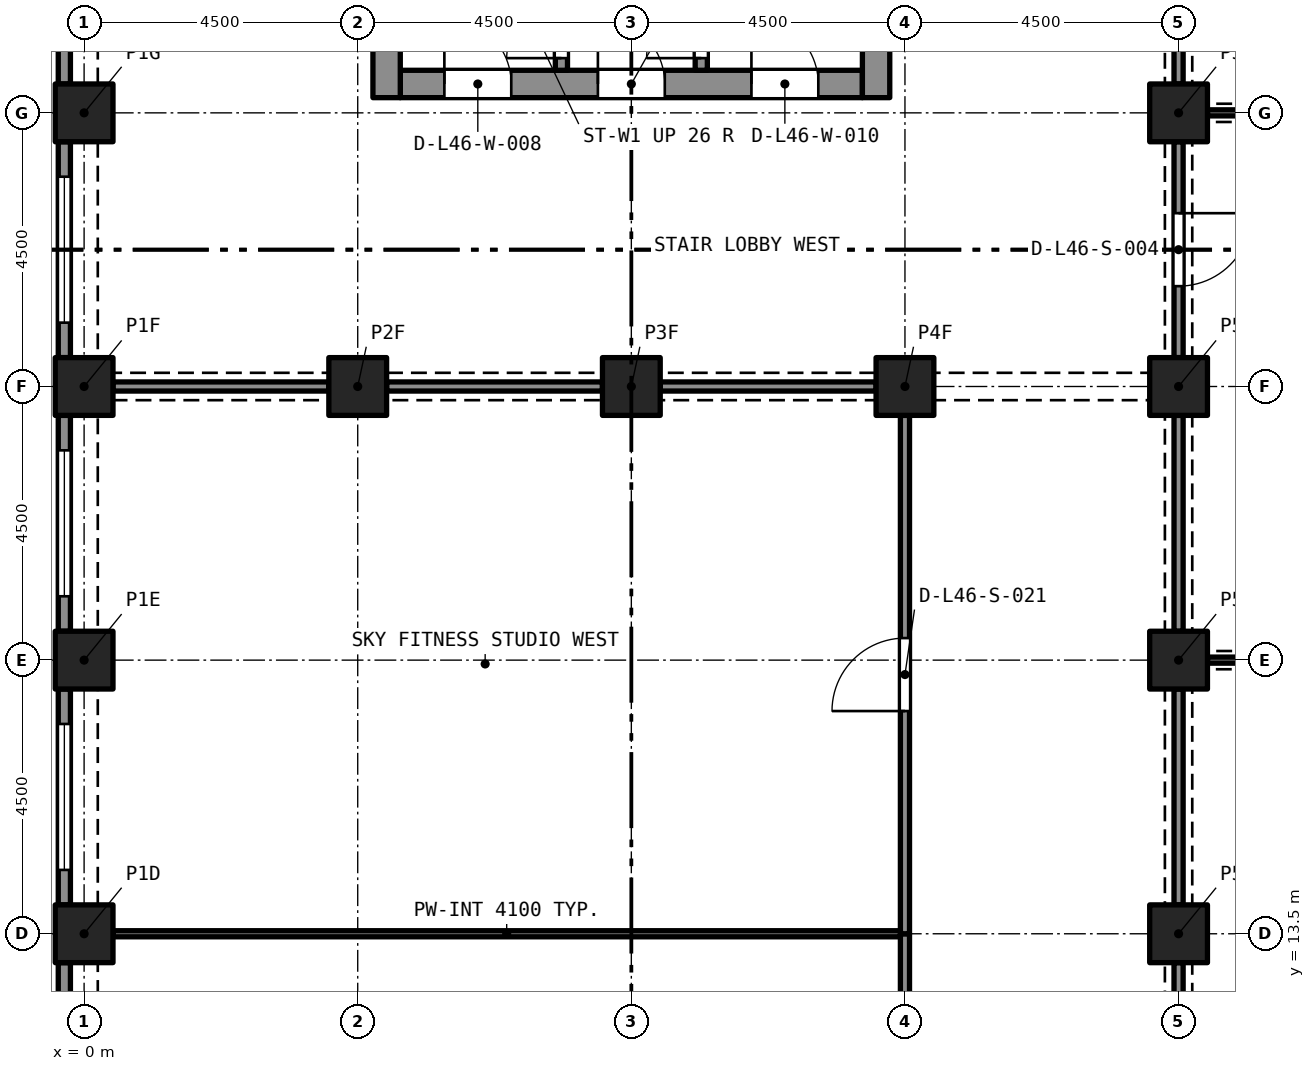
"""IFC4 building model, lengths in metres.
Left out: names, types, materials, properties, quantities, classifications, styles, units other than length and angle.
Written with IfcOpenShell. Run it as: python <this file> out.ifc"""

import sys

from ifc_helpers import new_model, si_unit, direction, frame, frame_2d, origin, origin_2d, place, context, subcontext, project, spatial, rectangle, extrude, element, fill, save


model = new_model("IFC4")
c1 = context("Model", 3, precision=1e-05, world=origin(), true_north=direction((0.0, 1.0)))
c2 = subcontext(c1, "Body", "Model", "MODEL_VIEW")
j1 = project(units=[si_unit("LENGTHUNIT", "METRE"), si_unit("PLANEANGLEUNIT", "RADIAN")], contexts=[c1])
p1 = place(None, origin())
s1 = spatial("IfcSite", under=j1, at=p1, CompositionType="ELEMENT")
p2 = place(p1, origin())
s2 = spatial("IfcBuilding", under=s1, at=p2, CompositionType="ELEMENT")
p3 = place(p2, frame((0.0, 0.0, 168.2)))
s3 = spatial("IfcBuildingStorey", under=s2, at=p3, CompositionType="ELEMENT", Elevation=168.2)
for number, where, z_axis, x_axis in (
    (1, (0.0, 13.5, 0.0), (0.0, 0.0, 1.0), (1.0, 0.0, 0.0)),
    (2, (18.0, 13.5, 0.0), (0.0, 0.0, 1.0), (1.0, 0.0, 0.0)),
    (3, (0.0, 18.0, 0.0), (0.0, 0.0, 1.0), (1.0, 0.0, 0.0)),
    (4, (18.0, 18.0, 0.0), (0.0, 0.0, 1.0), (1.0, 0.0, 0.0)),
    (5, (0.0, 22.5, 0.0), (0.0, 0.0, 1.0), (1.0, 0.0, 0.0)),
    (6, (4.5, 22.5, 0.0), (0.0, 0.0, 1.0), (1.0, 0.0, 0.0)),
    (7, (9.0, 22.5, 0.0), (0.0, 0.0, 1.0), (1.0, 0.0, 0.0)),
    (8, (13.5, 22.5, 0.0), (0.0, 0.0, 1.0), (1.0, 0.0, 0.0)),
    (9, (18.0, 22.5, 0.0), (0.0, 0.0, 1.0), (1.0, 0.0, 0.0)),
    (10, (0.0, 27.0, 0.0), (0.0, 0.0, 1.0), (1.0, 0.0, 0.0)),
    (11, (18.0, 27.0, 0.0), (0.0, 0.0, 1.0), (1.0, 0.0, 0.0)),
):
    element("IfcColumn", number, at=place(p3, frame(where, z_axis=z_axis, x_axis=x_axis)), inside=s3, PredefinedType="COLUMN", context=c2, shape_type="SweptSolid", body=[
        extrude(rectangle(XDim=0.95, YDim=0.95, at=origin_2d()), origin(), (0.0, 0.0, 1.0), 4.4),
    ])
p4 = place(p3, frame((5.2, 27.475, 0.0), z_axis=(0.0, 0.0, 1.0), x_axis=(1.0, 0.0, 0.0)))
e12 = element("IfcWall", 12, at=p4, inside=s3, PredefinedType="SOLIDWALL", context=c2, shape_type="SweptSolid", body=[
    extrude(rectangle(XDim=7.6, YDim=0.45, at=frame_2d((3.8, 0.0))), origin(), (0.0, 0.0, 1.0), 4.4),
])
p5 = place(p4, frame((0.725, 0.0, 0.0)))
e13 = element("IfcOpeningElement", 13, at=p5, cuts=e12, PredefinedType="OPENING", context=c2, shape_type="SweptSolid", body=[
    extrude(rectangle(XDim=1.1, YDim=2.1, at=frame_2d((0.55, 1.05))), frame((0.0, 0.235, 0.0), z_axis=(0.0, -1.0, 0.0), x_axis=(1.0, 0.0, 0.0)), (0.0, 0.0, 1.0), 0.47),
])
p6 = place(p4, frame((3.25, 0.0, 0.0)))
e14 = element("IfcOpeningElement", 14, at=p6, cuts=e12, PredefinedType="OPENING", context=c2, shape_type="SweptSolid", body=[
    extrude(rectangle(XDim=1.1, YDim=2.1, at=frame_2d((0.55, 1.05))), frame((0.0, 0.235, 0.0), z_axis=(0.0, -1.0, 0.0), x_axis=(1.0, 0.0, 0.0)), (0.0, 0.0, 1.0), 0.47),
])
p7 = place(p4, frame((5.775, 0.0, 0.0)))
e15 = element("IfcOpeningElement", 15, at=p7, cuts=e12, PredefinedType="OPENING", context=c2, shape_type="SweptSolid", body=[
    extrude(rectangle(XDim=1.1, YDim=2.1, at=frame_2d((0.55, 1.05))), frame((0.0, 0.235, 0.0), z_axis=(0.0, -1.0, 0.0), x_axis=(1.0, 0.0, 0.0)), (0.0, 0.0, 1.0), 0.47),
])
p8 = place(p3, frame((4.975, 27.25, 0.0), z_axis=(0.0, 0.0, 1.0), x_axis=(0.0, 1.0, 0.0)))
e16 = element("IfcWall", 16, at=p8, inside=s3, PredefinedType="SOLIDWALL", context=c2, shape_type="SweptSolid", body=[
    extrude(rectangle(XDim=13.0, YDim=0.45, at=frame_2d((6.5, 0.0))), origin(), (0.0, 0.0, 1.0), 4.4),
])
p9 = place(p8, frame((8.7, 0.0, 0.0)))
e17 = element("IfcOpeningElement", 17, at=p9, cuts=e16, PredefinedType="OPENING", context=c2, shape_type="SweptSolid", body=[
    extrude(rectangle(XDim=1.2, YDim=2.1, at=frame_2d((0.6, 1.05))), frame((0.0, 0.235, 0.0), z_axis=(0.0, -1.0, 0.0), x_axis=(1.0, 0.0, 0.0)), (0.0, 0.0, 1.0), 0.47),
])
p10 = place(p3, frame((13.025, 27.25, 0.0), z_axis=(0.0, 0.0, 1.0), x_axis=(0.0, 1.0, 0.0)))
e18 = element("IfcWall", 18, at=p10, inside=s3, PredefinedType="SOLIDWALL", context=c2, shape_type="SweptSolid", body=[
    extrude(rectangle(XDim=13.0, YDim=0.45, at=frame_2d((6.5, 0.0))), origin(), (0.0, 0.0, 1.0), 4.4),
])
p11 = place(p10, frame((10.85, 0.0, 0.0)))
e19 = element("IfcOpeningElement", 19, at=p11, cuts=e18, PredefinedType="OPENING", context=c2, shape_type="SweptSolid", body=[
    extrude(rectangle(XDim=1.1, YDim=2.1, at=frame_2d((0.55, 1.05))), frame((0.0, 0.235, 0.0), z_axis=(0.0, -1.0, 0.0), x_axis=(1.0, 0.0, 0.0)), (0.0, 0.0, 1.0), 0.47),
])
p12 = place(p10, frame((8.7, 0.0, 0.0)))
e20 = element("IfcOpeningElement", 20, at=p12, cuts=e18, PredefinedType="OPENING", context=c2, shape_type="SweptSolid", body=[
    extrude(rectangle(XDim=1.2, YDim=2.1, at=frame_2d((0.6, 1.05))), frame((0.0, 0.235, 0.0), z_axis=(0.0, -1.0, 0.0), x_axis=(1.0, 0.0, 0.0)), (0.0, 0.0, 1.0), 0.47),
])
p13 = place(p3, frame((-0.325, 27.475, 0.0), z_axis=(0.0, 0.0, 1.0), x_axis=(0.0, 1.0, 0.0)))
e21 = element("IfcWall", 21, at=p13, inside=s3, PredefinedType="SOLIDWALL", context=c2, shape_type="SweptSolid", body=[
    extrude(rectangle(XDim=3.55, YDim=0.2, at=frame_2d((1.775, 0.0))), origin(), (0.0, 0.0, 1.0), 4.4),
])
p14 = place(p13, frame((0.575, 0.0, 0.45)))
e22 = element("IfcOpeningElement", 22, at=p14, cuts=e21, PredefinedType="OPENING", context=c2, shape_type="SweptSolid", body=[
    extrude(rectangle(XDim=2.4, YDim=2.55, at=frame_2d((1.2, 1.275))), frame((0.0, 0.11, 0.0), z_axis=(0.0, -1.0, 0.0), x_axis=(1.0, 0.0, 0.0)), (0.0, 0.0, 1.0), 0.22),
])
p15 = place(p3, frame((-0.325, 22.975, 0.0), z_axis=(0.0, 0.0, 1.0), x_axis=(0.0, 1.0, 0.0)))
e23 = element("IfcWall", 23, at=p15, inside=s3, PredefinedType="SOLIDWALL", context=c2, shape_type="SweptSolid", body=[
    extrude(rectangle(XDim=3.55, YDim=0.2, at=frame_2d((1.775, 0.0))), origin(), (0.0, 0.0, 1.0), 4.4),
])
p16 = place(p15, frame((0.575, 0.0, 0.45)))
e24 = element("IfcOpeningElement", 24, at=p16, cuts=e23, PredefinedType="OPENING", context=c2, shape_type="SweptSolid", body=[
    extrude(rectangle(XDim=2.4, YDim=2.55, at=frame_2d((1.2, 1.275))), frame((0.0, 0.11, 0.0), z_axis=(0.0, -1.0, 0.0), x_axis=(1.0, 0.0, 0.0)), (0.0, 0.0, 1.0), 0.22),
])
p17 = place(p3, frame((-0.325, 18.475, 0.0), z_axis=(0.0, 0.0, 1.0), x_axis=(0.0, 1.0, 0.0)))
e25 = element("IfcWall", 25, at=p17, inside=s3, PredefinedType="SOLIDWALL", context=c2, shape_type="SweptSolid", body=[
    extrude(rectangle(XDim=3.55, YDim=0.2, at=frame_2d((1.775, 0.0))), origin(), (0.0, 0.0, 1.0), 4.4),
])
p18 = place(p17, frame((0.575, 0.0, 0.45)))
e26 = element("IfcOpeningElement", 26, at=p18, cuts=e25, PredefinedType="OPENING", context=c2, shape_type="SweptSolid", body=[
    extrude(rectangle(XDim=2.4, YDim=2.55, at=frame_2d((1.2, 1.275))), frame((0.0, 0.11, 0.0), z_axis=(0.0, -1.0, 0.0), x_axis=(1.0, 0.0, 0.0)), (0.0, 0.0, 1.0), 0.22),
])
p19 = place(p3, frame((-0.325, 13.975, 0.0), z_axis=(0.0, 0.0, 1.0), x_axis=(0.0, 1.0, 0.0)))
e27 = element("IfcWall", 27, at=p19, inside=s3, PredefinedType="SOLIDWALL", context=c2, shape_type="SweptSolid", body=[
    extrude(rectangle(XDim=3.55, YDim=0.2, at=frame_2d((1.775, 0.0))), origin(), (0.0, 0.0, 1.0), 4.4),
])
p20 = place(p19, frame((0.575, 0.0, 0.45)))
e28 = element("IfcOpeningElement", 28, at=p20, cuts=e27, PredefinedType="OPENING", context=c2, shape_type="SweptSolid", body=[
    extrude(rectangle(XDim=2.4, YDim=2.55, at=frame_2d((1.2, 1.275))), frame((0.0, 0.11, 0.0), z_axis=(0.0, -1.0, 0.0), x_axis=(1.0, 0.0, 0.0)), (0.0, 0.0, 1.0), 0.22),
])
p21 = place(p3, frame((-0.325, 9.475, 0.0), z_axis=(0.0, 0.0, 1.0), x_axis=(0.0, 1.0, 0.0)))
e29 = element("IfcWall", 29, at=p21, inside=s3, PredefinedType="SOLIDWALL", context=c2, shape_type="SweptSolid", body=[
    extrude(rectangle(XDim=3.55, YDim=0.2, at=frame_2d((1.775, 0.0))), origin(), (0.0, 0.0, 1.0), 4.4),
])
p22 = place(p21, frame((0.575, 0.0, 0.45)))
e30 = element("IfcOpeningElement", 30, at=p22, cuts=e29, PredefinedType="OPENING", context=c2, shape_type="SweptSolid", body=[
    extrude(rectangle(XDim=2.4, YDim=2.55, at=frame_2d((1.2, 1.275))), frame((0.0, 0.11, 0.0), z_axis=(0.0, -1.0, 0.0), x_axis=(1.0, 0.0, 0.0)), (0.0, 0.0, 1.0), 0.22),
])
p23 = place(p3, frame((7.85, 27.7, 0.0), z_axis=(0.0, 0.0, 1.0), x_axis=(0.0, 1.0, 0.0)))
e31 = element("IfcWall", 31, at=p23, inside=s3, PredefinedType="SOLIDWALL", context=c2, shape_type="SweptSolid", body=[
    extrude(rectangle(XDim=5.4, YDim=0.2, at=frame_2d((2.7, 0.0))), origin(), (0.0, 0.0, 1.0), 4.1),
])
p24 = place(p23, frame((0.2, 0.0, 0.0)))
e32 = element("IfcOpeningElement", 32, at=p24, cuts=e31, PredefinedType="OPENING", context=c2, shape_type="SweptSolid", body=[
    extrude(rectangle(XDim=0.9, YDim=2.1, at=frame_2d((0.45, 1.05))), frame((0.0, 0.11, 0.0), z_axis=(0.0, -1.0, 0.0), x_axis=(1.0, 0.0, 0.0)), (0.0, 0.0, 1.0), 0.22),
])
p25 = place(p3, frame((10.15, 27.7, 0.0), z_axis=(0.0, 0.0, 1.0), x_axis=(0.0, 1.0, 0.0)))
e33 = element("IfcWall", 33, at=p25, inside=s3, PredefinedType="SOLIDWALL", context=c2, shape_type="SweptSolid", body=[
    extrude(rectangle(XDim=5.4, YDim=0.2, at=frame_2d((2.7, 0.0))), origin(), (0.0, 0.0, 1.0), 4.1),
])
p26 = place(p25, frame((0.2, 0.0, 0.0)))
e34 = element("IfcOpeningElement", 34, at=p26, cuts=e33, PredefinedType="OPENING", context=c2, shape_type="SweptSolid", body=[
    extrude(rectangle(XDim=0.9, YDim=2.1, at=frame_2d((0.45, 1.05))), frame((0.0, 0.11, 0.0), z_axis=(0.0, -1.0, 0.0), x_axis=(1.0, 0.0, 0.0)), (0.0, 0.0, 1.0), 0.22),
])
p27 = place(p3, frame((18.475, 18.0, 0.0), z_axis=(0.0, 0.0, 1.0), x_axis=(1.0, 0.0, 0.0)))
e35 = element("IfcWall", 35, at=p27, inside=s3, PredefinedType="PARTITIONING", context=c2, shape_type="SweptSolid", body=[
    extrude(rectangle(XDim=12.55, YDim=0.1, at=frame_2d((6.275, 0.0))), origin(), (0.0, 0.0, 1.0), 3.95),
])
p28 = place(p3, frame((18.0, 13.025, 0.0), z_axis=(0.0, 0.0, 1.0), x_axis=(0.0, -1.0, 0.0)))
e36 = element("IfcWall", 36, at=p28, inside=s3, PredefinedType="PARTITIONING", context=c2, shape_type="SweptSolid", body=[
    extrude(rectangle(XDim=3.55, YDim=0.15, at=frame_2d((1.775, 0.0))), origin(), (0.0, 0.0, 1.0), 3.58),
])
p29 = place(p28, frame((1.175, 0.0, 0.0)))
e37 = element("IfcOpeningElement", 37, at=p29, cuts=e36, PredefinedType="OPENING", context=c2, shape_type="SweptSolid", body=[
    extrude(rectangle(XDim=1.2, YDim=2.1, at=frame_2d((0.6, 1.05))), frame((0.0, 0.085, 0.0), z_axis=(0.0, -1.0, 0.0), x_axis=(1.0, 0.0, 0.0)), (0.0, 0.0, 1.0), 0.17),
])
p30 = place(p3, frame((18.0, 13.975, 0.0), z_axis=(0.0, 0.0, 1.0), x_axis=(0.0, 1.0, 0.0)))
e38 = element("IfcWall", 38, at=p30, inside=s3, PredefinedType="PARTITIONING", context=c2, shape_type="SweptSolid", body=[
    extrude(rectangle(XDim=3.55, YDim=0.15, at=frame_2d((1.775, 0.0))), origin(), (0.0, 0.0, 1.0), 3.58),
])
p31 = place(p3, frame((18.475, 27.0, 0.0), z_axis=(0.0, 0.0, 1.0), x_axis=(1.0, 0.0, 0.0)))
e39 = element("IfcWall", 39, at=p31, inside=s3, PredefinedType="PARTITIONING", context=c2, shape_type="SweptSolid", body=[
    extrude(rectangle(XDim=12.55, YDim=0.1, at=frame_2d((6.275, 0.0))), origin(), (0.0, 0.0, 1.0), 3.95),
])
p32 = place(p3, frame((18.0, 26.525, 0.0), z_axis=(0.0, 0.0, 1.0), x_axis=(0.0, -1.0, 0.0)))
e40 = element("IfcWall", 40, at=p32, inside=s3, PredefinedType="PARTITIONING", context=c2, shape_type="SweptSolid", body=[
    extrude(rectangle(XDim=3.55, YDim=0.15, at=frame_2d((1.775, 0.0))), origin(), (0.0, 0.0, 1.0), 3.58),
])
p33 = place(p32, frame((1.175, 0.0, 0.0)))
e41 = element("IfcOpeningElement", 41, at=p33, cuts=e40, PredefinedType="OPENING", context=c2, shape_type="SweptSolid", body=[
    extrude(rectangle(XDim=1.2, YDim=2.1, at=frame_2d((0.6, 1.05))), frame((0.0, 0.085, 0.0), z_axis=(0.0, -1.0, 0.0), x_axis=(1.0, 0.0, 0.0)), (0.0, 0.0, 1.0), 0.17),
])
p34 = place(p3, frame((18.0, 18.475, 0.0), z_axis=(0.0, 0.0, 1.0), x_axis=(0.0, 1.0, 0.0)))
e42 = element("IfcWall", 42, at=p34, inside=s3, PredefinedType="PARTITIONING", context=c2, shape_type="SweptSolid", body=[
    extrude(rectangle(XDim=3.55, YDim=0.15, at=frame_2d((1.775, 0.0))), origin(), (0.0, 0.0, 1.0), 3.58),
])
p35 = place(p3, frame((18.0, 31.025, 0.0), z_axis=(0.0, 0.0, 1.0), x_axis=(0.0, -1.0, 0.0)))
e43 = element("IfcWall", 43, at=p35, inside=s3, PredefinedType="PARTITIONING", context=c2, shape_type="SweptSolid", body=[
    extrude(rectangle(XDim=3.55, YDim=0.15, at=frame_2d((1.775, 0.0))), origin(), (0.0, 0.0, 1.0), 3.58),
])
p36 = place(p35, frame((1.175, 0.0, 0.0)))
e44 = element("IfcOpeningElement", 44, at=p36, cuts=e43, PredefinedType="OPENING", context=c2, shape_type="SweptSolid", body=[
    extrude(rectangle(XDim=1.2, YDim=2.1, at=frame_2d((0.6, 1.05))), frame((0.0, 0.085, 0.0), z_axis=(0.0, -1.0, 0.0), x_axis=(1.0, 0.0, 0.0)), (0.0, 0.0, 1.0), 0.17),
])
for number, where, z_axis, x_axis in (
    (45, (9.475, 22.5, 0.0), (0.0, 0.0, 1.0), (1.0, 0.0, 0.0)),
    (46, (4.975, 22.5, 0.0), (0.0, 0.0, 1.0), (1.0, 0.0, 0.0)),
    (47, (0.475, 22.5, 0.0), (0.0, 0.0, 1.0), (1.0, 0.0, 0.0)),
):
    element("IfcWall", number, at=place(p3, frame(where, z_axis=z_axis, x_axis=x_axis)), inside=s3, PredefinedType="PARTITIONING", context=c2, shape_type="SweptSolid", body=[
        extrude(rectangle(XDim=3.55, YDim=0.15, at=frame_2d((1.775, 0.0))), origin(), (0.0, 0.0, 1.0), 3.58),
    ])
p37 = place(p3, frame((13.5, 4.5, 0.0), z_axis=(0.0, 0.0, 1.0), x_axis=(0.0, 1.0, 0.0)))
e48 = element("IfcWall", 48, at=p37, inside=s3, PredefinedType="PARTITIONING", context=c2, shape_type="SweptSolid", body=[
    extrude(rectangle(XDim=9.0, YDim=0.15, at=frame_2d((4.5, 0.0))), origin(), (0.0, 0.0, 1.0), 4.1),
])
p38 = place(p37, frame((3.9, 0.0, 0.0)))
e49 = element("IfcOpeningElement", 49, at=p38, cuts=e48, PredefinedType="OPENING", context=c2, shape_type="SweptSolid", body=[
    extrude(rectangle(XDim=1.2, YDim=2.1, at=frame_2d((0.6, 1.05))), frame((0.0, 0.085, 0.0), z_axis=(0.0, -1.0, 0.0), x_axis=(1.0, 0.0, 0.0)), (0.0, 0.0, 1.0), 0.17),
])
p39 = place(p3, frame((13.5, 13.5, 0.0), z_axis=(0.0, 0.0, 1.0), x_axis=(0.0, 1.0, 0.0)))
e50 = element("IfcWall", 50, at=p39, inside=s3, PredefinedType="PARTITIONING", context=c2, shape_type="SweptSolid", body=[
    extrude(rectangle(XDim=8.525, YDim=0.15, at=frame_2d((4.262, 0.0))), origin(), (0.0, 0.0, 1.0), 4.1),
])
p40 = place(p39, frame((3.663, 0.0, 0.0)))
e51 = element("IfcOpeningElement", 51, at=p40, cuts=e50, PredefinedType="OPENING", context=c2, shape_type="SweptSolid", body=[
    extrude(rectangle(XDim=1.2, YDim=2.1, at=frame_2d((0.6, 1.05))), frame((0.0, 0.085, 0.0), z_axis=(0.0, -1.0, 0.0), x_axis=(1.0, 0.0, 0.0)), (0.0, 0.0, 1.0), 0.17),
])
p41 = place(p3, frame((0.475, 13.5, 0.0), z_axis=(0.0, 0.0, 1.0), x_axis=(1.0, 0.0, 0.0)))
e52 = element("IfcWall", 52, at=p41, inside=s3, PredefinedType="PARTITIONING", context=c2, shape_type="SweptSolid", body=[
    extrude(rectangle(XDim=12.95, YDim=0.1, at=frame_2d((6.475, 0.0))), origin(), (0.0, 0.0, 1.0), 4.1),
])
p42 = place(p16, origin())
e53 = element("IfcWindow", 53, at=p42, inside=s3, PartitioningType="SINGLE_PANEL", PredefinedType="WINDOW", context=c2, shape_type="SweptSolid", body=[
    extrude(rectangle(XDim=2.4, YDim=2.55, at=frame_2d((1.2, 1.275))), frame((0.0, 0.03, 0.0), z_axis=(0.0, -1.0, 0.0), x_axis=(1.0, 0.0, 0.0)), (0.0, 0.0, 1.0), 0.06),
])
fill(e24, e53)
p43 = place(p18, origin())
e54 = element("IfcWindow", 54, at=p43, inside=s3, PartitioningType="SINGLE_PANEL", PredefinedType="WINDOW", context=c2, shape_type="SweptSolid", body=[
    extrude(rectangle(XDim=2.4, YDim=2.55, at=frame_2d((1.2, 1.275))), frame((0.0, 0.03, 0.0), z_axis=(0.0, -1.0, 0.0), x_axis=(1.0, 0.0, 0.0)), (0.0, 0.0, 1.0), 0.06),
])
fill(e26, e54)
p44 = place(p20, origin())
e55 = element("IfcWindow", 55, at=p44, inside=s3, PartitioningType="SINGLE_PANEL", PredefinedType="WINDOW", context=c2, shape_type="SweptSolid", body=[
    extrude(rectangle(XDim=2.4, YDim=2.55, at=frame_2d((1.2, 1.275))), frame((0.0, 0.03, 0.0), z_axis=(0.0, -1.0, 0.0), x_axis=(1.0, 0.0, 0.0)), (0.0, 0.0, 1.0), 0.06),
])
fill(e28, e55)
p45 = place(p24, origin())
e56 = element("IfcDoor", 56, at=p45, inside=s3, OperationType="SINGLE_SWING_LEFT", PredefinedType="DOOR", context=c2, shape_type="SweptSolid", body=[
    extrude(rectangle(XDim=0.9, YDim=2.1, at=frame_2d((0.45, 1.05))), frame((0.0, 0.025, 0.0), z_axis=(0.0, -1.0, 0.0), x_axis=(1.0, 0.0, 0.0)), (0.0, 0.0, 1.0), 0.05),
])
fill(e32, e56)
p46 = place(p26, origin())
e57 = element("IfcDoor", 57, at=p46, inside=s3, OperationType="SINGLE_SWING_LEFT", PredefinedType="DOOR", context=c2, shape_type="SweptSolid", body=[
    extrude(rectangle(XDim=0.9, YDim=2.1, at=frame_2d((0.45, 1.05))), frame((0.0, 0.025, 0.0), z_axis=(0.0, -1.0, 0.0), x_axis=(1.0, 0.0, 0.0)), (0.0, 0.0, 1.0), 0.05),
])
fill(e34, e57)
p47 = place(p5, origin())
e58 = element("IfcDoor", 58, at=p47, inside=s3, OperationType="SINGLE_SWING_LEFT", PredefinedType="DOOR", context=c2, shape_type="SweptSolid", body=[
    extrude(rectangle(XDim=1.1, YDim=2.1, at=frame_2d((0.55, 1.05))), frame((0.0, 0.025, 0.0), z_axis=(0.0, -1.0, 0.0), x_axis=(1.0, 0.0, 0.0)), (0.0, 0.0, 1.0), 0.05),
])
fill(e13, e58)
p48 = place(p6, origin())
e59 = element("IfcDoor", 59, at=p48, inside=s3, OperationType="SINGLE_SWING_LEFT", PredefinedType="DOOR", context=c2, shape_type="SweptSolid", body=[
    extrude(rectangle(XDim=1.1, YDim=2.1, at=frame_2d((0.55, 1.05))), frame((0.0, 0.025, 0.0), z_axis=(0.0, -1.0, 0.0), x_axis=(1.0, 0.0, 0.0)), (0.0, 0.0, 1.0), 0.05),
])
fill(e14, e59)
p49 = place(p7, origin())
e60 = element("IfcDoor", 60, at=p49, inside=s3, OperationType="SINGLE_SWING_LEFT", PredefinedType="DOOR", context=c2, shape_type="SweptSolid", body=[
    extrude(rectangle(XDim=1.1, YDim=2.1, at=frame_2d((0.55, 1.05))), frame((0.0, 0.025, 0.0), z_axis=(0.0, -1.0, 0.0), x_axis=(1.0, 0.0, 0.0)), (0.0, 0.0, 1.0), 0.05),
])
fill(e15, e60)
p50 = place(p33, origin())
e61 = element("IfcDoor", 61, at=p50, inside=s3, OperationType="SINGLE_SWING_LEFT", PredefinedType="DOOR", context=c2, shape_type="SweptSolid", body=[
    extrude(rectangle(XDim=1.2, YDim=2.1, at=frame_2d((0.6, 1.05))), frame((0.0, 0.025, 0.0), z_axis=(0.0, -1.0, 0.0), x_axis=(1.0, 0.0, 0.0)), (0.0, 0.0, 1.0), 0.05),
])
fill(e41, e61)
p51 = place(p40, origin())
e62 = element("IfcDoor", 62, at=p51, inside=s3, OperationType="SINGLE_SWING_RIGHT", PredefinedType="DOOR", context=c2, shape_type="SweptSolid", body=[
    extrude(rectangle(XDim=1.2, YDim=2.1, at=frame_2d((0.6, 1.05))), frame((0.0, 0.025, 0.0), z_axis=(0.0, -1.0, 0.0), x_axis=(1.0, 0.0, 0.0)), (0.0, 0.0, 1.0), 0.05),
])
fill(e51, e62)
save(model, sys.argv[1])
